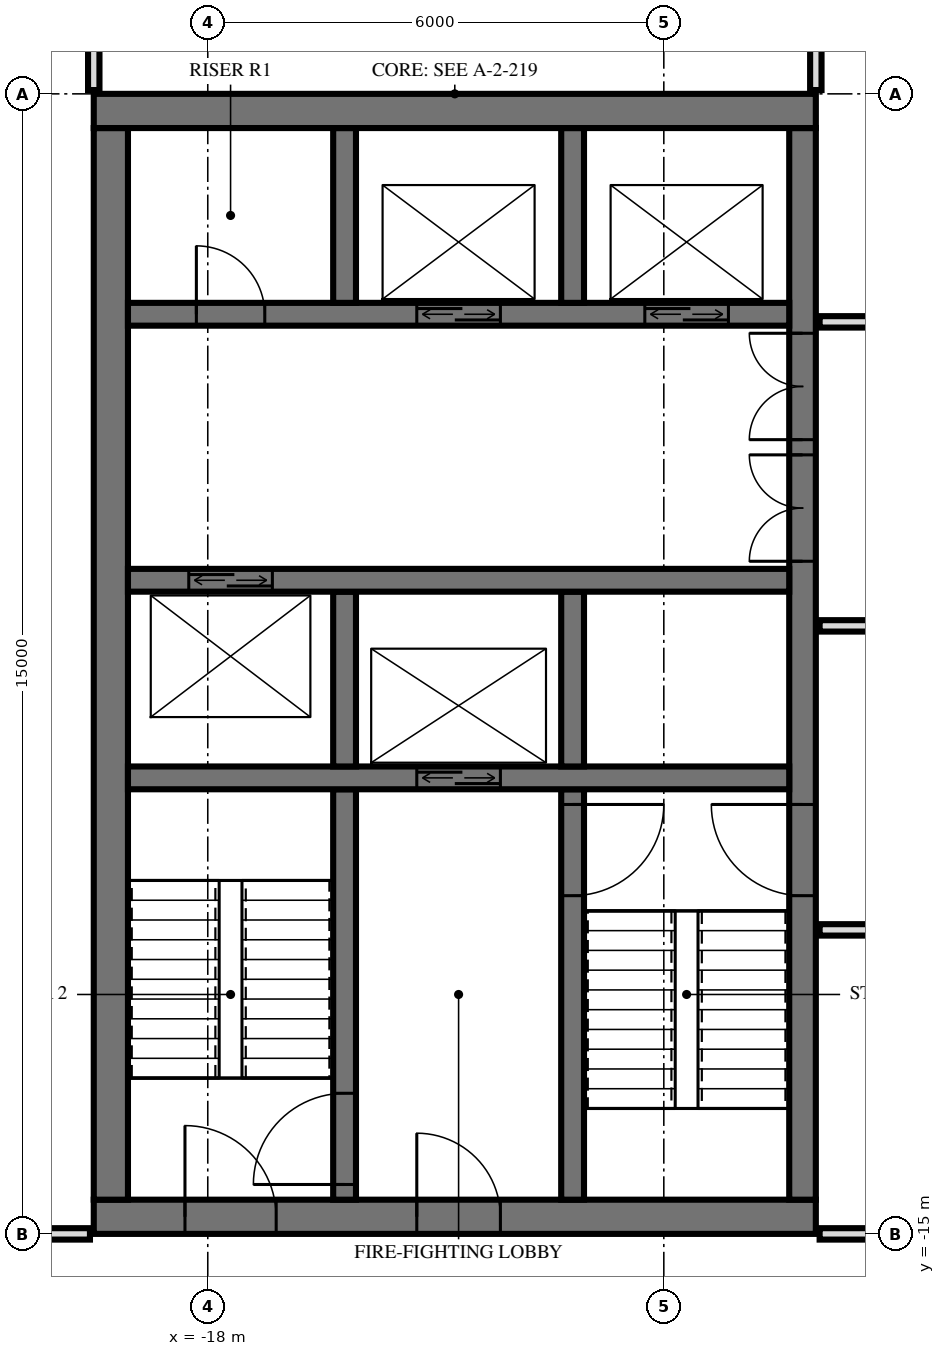
"""IFC4 building model, lengths in metres.
Left out: names, types, materials, properties, quantities, classifications, styles, units other than length and angle.
Written with IfcOpenShell. Run it as: python <this file> out.ifc"""

import sys

from ifc_helpers import new_model, si_unit, direction, frame, frame_2d, origin, place, context, subcontext, project, spatial, rectangle, extrude, element, fill, save


model = new_model("IFC4")
c1 = context("Model", 3, precision=1e-05, world=origin(), true_north=direction((0.0, 1.0)))
c2 = subcontext(c1, "Body", "Model", "MODEL_VIEW")
j1 = project(units=[si_unit("LENGTHUNIT", "METRE"), si_unit("PLANEANGLEUNIT", "RADIAN")], contexts=[c1])
p1 = place(None, origin())
s1 = spatial("IfcSite", under=j1, at=p1, CompositionType="ELEMENT")
p2 = place(p1, origin())
s2 = spatial("IfcBuilding", under=s1, at=p2, CompositionType="ELEMENT")
p3 = place(p2, frame((0.0, 0.0, 318.6)))
s3 = spatial("IfcBuildingStorey", under=s2, at=p3, CompositionType="ELEMENT", Elevation=318.6)
p4 = place(p3, frame((-19.5, -0.225, 0.0), z_axis=(0.0, 0.0, 1.0), x_axis=(1.0, 0.0, 0.0)))
e1 = element("IfcWall", 1, at=p4, inside=s3, PredefinedType="SHEAR", context=c2, shape_type="SweptSolid", body=[
    extrude(rectangle(XDim=9.5, YDim=0.45, at=frame_2d((4.75, 0.0))), origin(), (0.0, 0.0, 1.0), 4.0),
])
p5 = place(p3, frame((-19.5, -14.775, 0.0), z_axis=(0.0, 0.0, 1.0), x_axis=(1.0, 0.0, 0.0)))
e2 = element("IfcWall", 2, at=p5, inside=s3, PredefinedType="SHEAR", context=c2, shape_type="SweptSolid", body=[
    extrude(rectangle(XDim=9.5, YDim=0.45, at=frame_2d((4.75, 0.0))), origin(), (0.0, 0.0, 1.0), 4.0),
])
p6 = place(p5, frame((1.2, 0.0, 0.0)))
e3 = element("IfcOpeningElement", 3, at=p6, cuts=e2, PredefinedType="OPENING", context=c2, shape_type="SweptSolid", body=[
    extrude(rectangle(XDim=1.2, YDim=2.1, at=frame_2d((0.6, 1.05))), frame((0.0, 0.235, 0.0), z_axis=(0.0, -1.0, 0.0), x_axis=(1.0, 0.0, 0.0)), (0.0, 0.0, 1.0), 0.47),
])
p7 = place(p5, frame((4.25, 0.0, 0.0)))
e4 = element("IfcOpeningElement", 4, at=p7, cuts=e2, PredefinedType="OPENING", context=c2, shape_type="SweptSolid", body=[
    extrude(rectangle(XDim=1.1, YDim=2.1, at=frame_2d((0.55, 1.05))), frame((0.0, 0.235, 0.0), z_axis=(0.0, -1.0, 0.0), x_axis=(1.0, 0.0, 0.0)), (0.0, 0.0, 1.0), 0.47),
])
p8 = place(p3, frame((-10.175, -14.55, 0.0), z_axis=(0.0, 0.0, 1.0), x_axis=(0.0, 1.0, 0.0)))
e5 = element("IfcWall", 5, at=p8, inside=s3, PredefinedType="SHEAR", context=c2, shape_type="SweptSolid", body=[
    extrude(rectangle(XDim=14.1, YDim=0.35, at=frame_2d((7.05, 0.0))), origin(), (0.0, 0.0, 1.0), 4.0),
])
p9 = place(p8, frame((8.4, 0.0, 0.0)))
e6 = element("IfcOpeningElement", 6, at=p9, cuts=e5, PredefinedType="OPENING", context=c2, shape_type="SweptSolid", body=[
    extrude(rectangle(XDim=1.4, YDim=2.4, at=frame_2d((0.7, 1.2))), frame((0.0, 0.185, 0.0), z_axis=(0.0, -1.0, 0.0), x_axis=(1.0, 0.0, 0.0)), (0.0, 0.0, 1.0), 0.37),
])
p10 = place(p8, frame((10.0, 0.0, 0.0)))
e7 = element("IfcOpeningElement", 7, at=p10, cuts=e5, PredefinedType="OPENING", context=c2, shape_type="SweptSolid", body=[
    extrude(rectangle(XDim=1.4, YDim=2.4, at=frame_2d((0.7, 1.2))), frame((0.0, 0.185, 0.0), z_axis=(0.0, -1.0, 0.0), x_axis=(1.0, 0.0, 0.0)), (0.0, 0.0, 1.0), 0.37),
])
p11 = place(p8, frame((4.0, 0.0, 0.0)))
e8 = element("IfcOpeningElement", 8, at=p11, cuts=e5, PredefinedType="OPENING", context=c2, shape_type="SweptSolid", body=[
    extrude(rectangle(XDim=1.2, YDim=2.1, at=frame_2d((0.6, 1.05))), frame((0.0, 0.185, 0.0), z_axis=(0.0, -1.0, 0.0), x_axis=(1.0, 0.0, 0.0)), (0.0, 0.0, 1.0), 0.37),
])
p12 = place(p3, frame((-19.275, -14.55, 0.0), z_axis=(0.0, 0.0, 1.0), x_axis=(0.0, 1.0, 0.0)))
e9 = element("IfcWall", 9, at=p12, inside=s3, PredefinedType="SHEAR", context=c2, shape_type="SweptSolid", body=[
    extrude(rectangle(XDim=14.1, YDim=0.45, at=frame_2d((7.05, 0.0))), origin(), (0.0, 0.0, 1.0), 4.0),
])
p13 = place(p3, frame((-19.05, -2.9, 0.0), z_axis=(0.0, 0.0, 1.0), x_axis=(1.0, 0.0, 0.0)))
e10 = element("IfcWall", 10, at=p13, inside=s3, PredefinedType="SHEAR", context=c2, shape_type="SweptSolid", body=[
    extrude(rectangle(XDim=8.7, YDim=0.3, at=frame_2d((4.35, 0.0))), origin(), (0.0, 0.0, 1.0), 4.0),
])
p14 = place(p13, frame((6.8, 0.0, 0.0)))
e11 = element("IfcOpeningElement", 11, at=p14, cuts=e10, PredefinedType="OPENING", context=c2, shape_type="SweptSolid", body=[
    extrude(rectangle(XDim=1.1, YDim=2.1, at=frame_2d((0.55, 1.05))), frame((0.0, 0.16, 0.0), z_axis=(0.0, -1.0, 0.0), x_axis=(1.0, 0.0, 0.0)), (0.0, 0.0, 1.0), 0.32),
])
p15 = place(p13, frame((3.8, 0.0, 0.0)))
e12 = element("IfcOpeningElement", 12, at=p15, cuts=e10, PredefinedType="OPENING", context=c2, shape_type="SweptSolid", body=[
    extrude(rectangle(XDim=1.1, YDim=2.1, at=frame_2d((0.55, 1.05))), frame((0.0, 0.16, 0.0), z_axis=(0.0, -1.0, 0.0), x_axis=(1.0, 0.0, 0.0)), (0.0, 0.0, 1.0), 0.32),
])
p16 = place(p13, frame((0.9, 0.0, 0.0)))
e13 = element("IfcOpeningElement", 13, at=p16, cuts=e10, PredefinedType="OPENING", context=c2, shape_type="SweptSolid", body=[
    extrude(rectangle(XDim=0.9, YDim=2.1, at=frame_2d((0.45, 1.05))), frame((0.0, 0.16, 0.0), z_axis=(0.0, -1.0, 0.0), x_axis=(1.0, 0.0, 0.0)), (0.0, 0.0, 1.0), 0.32),
])
p17 = place(p3, frame((-19.05, -6.4, 0.0), z_axis=(0.0, 0.0, 1.0), x_axis=(1.0, 0.0, 0.0)))
e14 = element("IfcWall", 14, at=p17, inside=s3, PredefinedType="SHEAR", context=c2, shape_type="SweptSolid", body=[
    extrude(rectangle(XDim=8.7, YDim=0.3, at=frame_2d((4.35, 0.0))), origin(), (0.0, 0.0, 1.0), 4.0),
])
p18 = place(p17, frame((0.8, 0.0, 0.0)))
e15 = element("IfcOpeningElement", 15, at=p18, cuts=e14, PredefinedType="OPENING", context=c2, shape_type="SweptSolid", body=[
    extrude(rectangle(XDim=1.1, YDim=2.1, at=frame_2d((0.55, 1.05))), frame((0.0, 0.16, 0.0), z_axis=(0.0, -1.0, 0.0), x_axis=(1.0, 0.0, 0.0)), (0.0, 0.0, 1.0), 0.32),
])
p19 = place(p3, frame((-19.05, -9.0, 0.0), z_axis=(0.0, 0.0, 1.0), x_axis=(1.0, 0.0, 0.0)))
e16 = element("IfcWall", 16, at=p19, inside=s3, PredefinedType="SHEAR", context=c2, shape_type="SweptSolid", body=[
    extrude(rectangle(XDim=8.7, YDim=0.3, at=frame_2d((4.35, 0.0))), origin(), (0.0, 0.0, 1.0), 4.0),
])
p20 = place(p19, frame((3.8, 0.0, 0.0)))
e17 = element("IfcOpeningElement", 17, at=p20, cuts=e16, PredefinedType="OPENING", context=c2, shape_type="SweptSolid", body=[
    extrude(rectangle(XDim=1.1, YDim=2.1, at=frame_2d((0.55, 1.05))), frame((0.0, 0.16, 0.0), z_axis=(0.0, -1.0, 0.0), x_axis=(1.0, 0.0, 0.0)), (0.0, 0.0, 1.0), 0.32),
])
for number, where, z_axis, x_axis in (
    (18, (-13.2, -2.75, 0.0), (0.0, 0.0, 1.0), (0.0, 1.0, 0.0)),
    (19, (-13.2, -8.85, 0.0), (0.0, 0.0, 1.0), (0.0, 1.0, 0.0)),
):
    element("IfcWall", number, at=place(p3, frame(where, z_axis=z_axis, x_axis=x_axis)), inside=s3, PredefinedType="SHEAR", context=c2, shape_type="SweptSolid", body=[
        extrude(rectangle(XDim=2.3, YDim=0.3, at=frame_2d((1.15, 0.0))), origin(), (0.0, 0.0, 1.0), 4.0),
    ])
p21 = place(p3, frame((-13.2, -14.55, 0.0), z_axis=(0.0, 0.0, 1.0), x_axis=(0.0, 1.0, 0.0)))
e20 = element("IfcWall", 20, at=p21, inside=s3, PredefinedType="SHEAR", context=c2, shape_type="SweptSolid", body=[
    extrude(rectangle(XDim=5.4, YDim=0.3, at=frame_2d((2.7, 0.0))), origin(), (0.0, 0.0, 1.0), 4.0),
])
p22 = place(p21, frame((4.0, 0.0, 0.0)))
e21 = element("IfcOpeningElement", 21, at=p22, cuts=e20, PredefinedType="OPENING", context=c2, shape_type="SweptSolid", body=[
    extrude(rectangle(XDim=1.2, YDim=2.1, at=frame_2d((0.6, 1.05))), frame((0.0, 0.16, 0.0), z_axis=(0.0, -1.0, 0.0), x_axis=(1.0, 0.0, 0.0)), (0.0, 0.0, 1.0), 0.32),
])
for number, where, z_axis, x_axis in (
    (22, (-16.2, -2.75, 0.0), (0.0, 0.0, 1.0), (0.0, 1.0, 0.0)),
    (23, (-16.2, -8.85, 0.0), (0.0, 0.0, 1.0), (0.0, 1.0, 0.0)),
):
    element("IfcWall", number, at=place(p3, frame(where, z_axis=z_axis, x_axis=x_axis)), inside=s3, PredefinedType="SHEAR", context=c2, shape_type="SweptSolid", body=[
        extrude(rectangle(XDim=2.3, YDim=0.3, at=frame_2d((1.15, 0.0))), origin(), (0.0, 0.0, 1.0), 4.0),
    ])
p23 = place(p3, frame((-16.2, -14.55, 0.0), z_axis=(0.0, 0.0, 1.0), x_axis=(0.0, 1.0, 0.0)))
e24 = element("IfcWall", 24, at=p23, inside=s3, PredefinedType="SHEAR", context=c2, shape_type="SweptSolid", body=[
    extrude(rectangle(XDim=5.4, YDim=0.3, at=frame_2d((2.7, 0.0))), origin(), (0.0, 0.0, 1.0), 4.0),
])
p24 = place(p23, frame((0.2, 0.0, 0.0)))
e25 = element("IfcOpeningElement", 25, at=p24, cuts=e24, PredefinedType="OPENING", context=c2, shape_type="SweptSolid", body=[
    extrude(rectangle(XDim=1.2, YDim=2.1, at=frame_2d((0.6, 1.05))), frame((0.0, 0.16, 0.0), z_axis=(0.0, -1.0, 0.0), x_axis=(1.0, 0.0, 0.0)), (0.0, 0.0, 1.0), 0.32),
])
p25 = place(p3, frame((-19.568, 1.175, 0.0), z_axis=(0.0, 0.0, 1.0), x_axis=(-0.949694735798, -0.313177120489, 0.0)))
e26 = element("IfcWall", 26, at=p25, inside=s3, PredefinedType="SOLIDWALL", context=c2, shape_type="SweptSolid", body=[
    extrude(rectangle(XDim=1.681, YDim=0.25, at=frame_2d((0.841, 0.0))), origin(), (0.0, 0.0, 1.0), 3.72),
])
p26 = place(p3, frame((-10.0, 0.05, 0.0), z_axis=(0.0, 0.0, 1.0), x_axis=(0.0, 1.0, 0.0)))
e27 = element("IfcWall", 27, at=p26, inside=s3, PredefinedType="PARTITIONING", context=c2, shape_type="SweptSolid", body=[
    extrude(rectangle(XDim=2.247, YDim=0.15, at=frame_2d((1.123, 0.0))), origin(), (0.0, 0.0, 1.0), 3.72),
])
p27 = place(p3, frame((-19.5, 0.05, 0.0), z_axis=(0.0, 0.0, 1.0), x_axis=(0.0, 1.0, 0.0)))
e28 = element("IfcWall", 28, at=p27, inside=s3, PredefinedType="PARTITIONING", context=c2, shape_type="SweptSolid", body=[
    extrude(rectangle(XDim=1.08, YDim=0.15, at=frame_2d((0.54, 0.0))), origin(), (0.0, 0.0, 1.0), 3.72),
])
p28 = place(p3, frame((-21.935, -15.0, 0.0), z_axis=(0.0, 0.0, 1.0), x_axis=(1.0, 0.0, 0.0)))
e29 = element("IfcWall", 29, at=p28, inside=s3, PredefinedType="PARTITIONING", context=c2, shape_type="SweptSolid", body=[
    extrude(rectangle(XDim=2.385, YDim=0.15, at=frame_2d((1.192, 0.0))), origin(), (0.0, 0.0, 1.0), 3.72),
])
p29 = place(p28, frame((0.627, 0.0, 0.0)))
e30 = element("IfcOpeningElement", 30, at=p29, cuts=e29, PredefinedType="OPENING", context=c2, shape_type="SweptSolid", body=[
    extrude(rectangle(XDim=1.0, YDim=2.1, at=frame_2d((0.5, 1.05))), frame((0.0, 0.085, 0.0), z_axis=(0.0, -1.0, 0.0), x_axis=(1.0, 0.0, 0.0)), (0.0, 0.0, 1.0), 0.17),
])
p30 = place(p3, frame((-9.95, -15.0, 0.0), z_axis=(0.0, 0.0, 1.0), x_axis=(1.0, 0.0, 0.0)))
e31 = element("IfcWall", 31, at=p30, inside=s3, PredefinedType="PARTITIONING", context=c2, shape_type="SweptSolid", body=[
    extrude(rectangle(XDim=2.642, YDim=0.15, at=frame_2d((1.321, 0.0))), origin(), (0.0, 0.0, 1.0), 3.084),
])
p31 = place(p3, frame((-9.95, -11.0, 0.0), z_axis=(0.0, 0.0, 1.0), x_axis=(1.0, 0.0, 0.0)))
e32 = element("IfcWall", 32, at=p31, inside=s3, PredefinedType="PARTITIONING", context=c2, shape_type="SweptSolid", body=[
    extrude(rectangle(XDim=19.9, YDim=0.15, at=frame_2d((9.95, 0.0))), origin(), (0.0, 0.0, 1.0), 3.72),
])
p32 = place(p31, frame((9.45, 0.0, 0.0)))
e33 = element("IfcOpeningElement", 33, at=p32, cuts=e32, PredefinedType="OPENING", context=c2, shape_type="SweptSolid", body=[
    extrude(rectangle(XDim=1.0, YDim=2.1, at=frame_2d((0.5, 1.05))), frame((0.0, 0.085, 0.0), z_axis=(0.0, -1.0, 0.0), x_axis=(1.0, 0.0, 0.0)), (0.0, 0.0, 1.0), 0.17),
])
p33 = place(p31, frame((15.45, 0.0, 0.0)))
e34 = element("IfcOpeningElement", 34, at=p33, cuts=e32, PredefinedType="OPENING", context=c2, shape_type="SweptSolid", body=[
    extrude(rectangle(XDim=1.0, YDim=2.1, at=frame_2d((0.5, 1.05))), frame((0.0, 0.085, 0.0), z_axis=(0.0, -1.0, 0.0), x_axis=(1.0, 0.0, 0.0)), (0.0, 0.0, 1.0), 0.17),
])
p34 = place(p3, frame((-9.95, -7.0, 0.0), z_axis=(0.0, 0.0, 1.0), x_axis=(1.0, 0.0, 0.0)))
e35 = element("IfcWall", 35, at=p34, inside=s3, PredefinedType="PARTITIONING", context=c2, shape_type="SweptSolid", body=[
    extrude(rectangle(XDim=19.9, YDim=0.15, at=frame_2d((9.95, 0.0))), origin(), (0.0, 0.0, 1.0), 3.72),
])
p35 = place(p34, frame((9.45, 0.0, 0.0)))
e36 = element("IfcOpeningElement", 36, at=p35, cuts=e35, PredefinedType="OPENING", context=c2, shape_type="SweptSolid", body=[
    extrude(rectangle(XDim=1.0, YDim=2.1, at=frame_2d((0.5, 1.05))), frame((0.0, 0.085, 0.0), z_axis=(0.0, -1.0, 0.0), x_axis=(1.0, 0.0, 0.0)), (0.0, 0.0, 1.0), 0.17),
])
p36 = place(p34, frame((3.45, 0.0, 0.0)))
e37 = element("IfcOpeningElement", 37, at=p36, cuts=e35, PredefinedType="OPENING", context=c2, shape_type="SweptSolid", body=[
    extrude(rectangle(XDim=1.0, YDim=2.1, at=frame_2d((0.5, 1.05))), frame((0.0, 0.085, 0.0), z_axis=(0.0, -1.0, 0.0), x_axis=(1.0, 0.0, 0.0)), (0.0, 0.0, 1.0), 0.17),
])
p37 = place(p3, frame((-9.95, -3.0, 0.0), z_axis=(0.0, 0.0, 1.0), x_axis=(1.0, 0.0, 0.0)))
e38 = element("IfcWall", 38, at=p37, inside=s3, PredefinedType="PARTITIONING", context=c2, shape_type="SweptSolid", body=[
    extrude(rectangle(XDim=19.9, YDim=0.15, at=frame_2d((9.95, 0.0))), origin(), (0.0, 0.0, 1.0), 3.72),
])
p38 = place(p37, frame((1.95, 0.0, 0.0)))
e39 = element("IfcOpeningElement", 39, at=p38, cuts=e38, PredefinedType="OPENING", context=c2, shape_type="SweptSolid", body=[
    extrude(rectangle(XDim=1.0, YDim=2.1, at=frame_2d((0.5, 1.05))), frame((0.0, 0.085, 0.0), z_axis=(0.0, -1.0, 0.0), x_axis=(1.0, 0.0, 0.0)), (0.0, 0.0, 1.0), 0.17),
])
p39 = place(p37, frame((5.95, 0.0, 0.0)))
e40 = element("IfcOpeningElement", 40, at=p39, cuts=e38, PredefinedType="OPENING", context=c2, shape_type="SweptSolid", body=[
    extrude(rectangle(XDim=1.0, YDim=2.1, at=frame_2d((0.5, 1.05))), frame((0.0, 0.085, 0.0), z_axis=(0.0, -1.0, 0.0), x_axis=(1.0, 0.0, 0.0)), (0.0, 0.0, 1.0), 0.17),
])
p40 = place(p37, frame((8.7, 0.0, 0.0)))
e41 = element("IfcOpeningElement", 41, at=p40, cuts=e38, PredefinedType="OPENING", context=c2, shape_type="SweptSolid", body=[
    extrude(rectangle(XDim=1.0, YDim=2.1, at=frame_2d((0.5, 1.05))), frame((0.0, 0.085, 0.0), z_axis=(0.0, -1.0, 0.0), x_axis=(1.0, 0.0, 0.0)), (0.0, 0.0, 1.0), 0.17),
])
p41 = place(p37, frame((14.7, 0.0, 0.0)))
e42 = element("IfcOpeningElement", 42, at=p41, cuts=e38, PredefinedType="OPENING", context=c2, shape_type="SweptSolid", body=[
    extrude(rectangle(XDim=1.0, YDim=2.1, at=frame_2d((0.5, 1.05))), frame((0.0, 0.085, 0.0), z_axis=(0.0, -1.0, 0.0), x_axis=(1.0, 0.0, 0.0)), (0.0, 0.0, 1.0), 0.17),
])
p42 = place(p14, origin())
e43 = element("IfcDoor", 43, at=p42, inside=s3, OperationType="DOUBLE_DOOR_SLIDING", PredefinedType="USERDEFINED", context=c2, shape_type="SweptSolid", body=[
    extrude(rectangle(XDim=1.1, YDim=2.1, at=frame_2d((0.55, 1.05))), frame((0.0, 0.025, 0.0), z_axis=(0.0, -1.0, 0.0), x_axis=(1.0, 0.0, 0.0)), (0.0, 0.0, 1.0), 0.05),
])
fill(e11, e43)
p43 = place(p15, origin())
e44 = element("IfcDoor", 44, at=p43, inside=s3, OperationType="DOUBLE_DOOR_SLIDING", PredefinedType="USERDEFINED", context=c2, shape_type="SweptSolid", body=[
    extrude(rectangle(XDim=1.1, YDim=2.1, at=frame_2d((0.55, 1.05))), frame((0.0, 0.025, 0.0), z_axis=(0.0, -1.0, 0.0), x_axis=(1.0, 0.0, 0.0)), (0.0, 0.0, 1.0), 0.05),
])
fill(e12, e44)
p44 = place(p20, origin())
e45 = element("IfcDoor", 45, at=p44, inside=s3, OperationType="DOUBLE_DOOR_SLIDING", PredefinedType="USERDEFINED", context=c2, shape_type="SweptSolid", body=[
    extrude(rectangle(XDim=1.1, YDim=2.1, at=frame_2d((0.55, 1.05))), frame((0.0, 0.025, 0.0), z_axis=(0.0, -1.0, 0.0), x_axis=(1.0, 0.0, 0.0)), (0.0, 0.0, 1.0), 0.05),
])
fill(e17, e45)
p45 = place(p18, origin())
e46 = element("IfcDoor", 46, at=p45, inside=s3, OperationType="DOUBLE_DOOR_SLIDING", PredefinedType="USERDEFINED", context=c2, shape_type="SweptSolid", body=[
    extrude(rectangle(XDim=1.1, YDim=2.1, at=frame_2d((0.55, 1.05))), frame((0.0, 0.025, 0.0), z_axis=(0.0, -1.0, 0.0), x_axis=(1.0, 0.0, 0.0)), (0.0, 0.0, 1.0), 0.05),
])
fill(e15, e46)
p46 = place(p9, origin())
e47 = element("IfcDoor", 47, at=p46, inside=s3, OperationType="DOUBLE_DOOR_SINGLE_SWING", PredefinedType="DOOR", context=c2, shape_type="SweptSolid", body=[
    extrude(rectangle(XDim=1.4, YDim=2.4, at=frame_2d((0.7, 1.2))), frame((0.0, 0.025, 0.0), z_axis=(0.0, -1.0, 0.0), x_axis=(1.0, 0.0, 0.0)), (0.0, 0.0, 1.0), 0.05),
])
fill(e6, e47)
p47 = place(p10, origin())
e48 = element("IfcDoor", 48, at=p47, inside=s3, OperationType="DOUBLE_DOOR_SINGLE_SWING", PredefinedType="DOOR", context=c2, shape_type="SweptSolid", body=[
    extrude(rectangle(XDim=1.4, YDim=2.4, at=frame_2d((0.7, 1.2))), frame((0.0, 0.025, 0.0), z_axis=(0.0, -1.0, 0.0), x_axis=(1.0, 0.0, 0.0)), (0.0, 0.0, 1.0), 0.05),
])
fill(e7, e48)
p48 = place(p11, origin())
e49 = element("IfcDoor", 49, at=p48, inside=s3, OperationType="SINGLE_SWING_LEFT", PredefinedType="DOOR", context=c2, shape_type="SweptSolid", body=[
    extrude(rectangle(XDim=1.2, YDim=2.1, at=frame_2d((0.6, 1.05))), frame((0.0, 0.025, 0.0), z_axis=(0.0, -1.0, 0.0), x_axis=(1.0, 0.0, 0.0)), (0.0, 0.0, 1.0), 0.05),
])
fill(e8, e49)
p49 = place(p6, origin())
e50 = element("IfcDoor", 50, at=p49, inside=s3, OperationType="SINGLE_SWING_RIGHT", PredefinedType="DOOR", context=c2, shape_type="SweptSolid", body=[
    extrude(rectangle(XDim=1.2, YDim=2.1, at=frame_2d((0.6, 1.05))), frame((0.0, 0.025, 0.0), z_axis=(0.0, -1.0, 0.0), x_axis=(1.0, 0.0, 0.0)), (0.0, 0.0, 1.0), 0.05),
])
fill(e3, e50)
p50 = place(p7, origin())
e51 = element("IfcDoor", 51, at=p50, inside=s3, OperationType="SINGLE_SWING_RIGHT", PredefinedType="DOOR", context=c2, shape_type="SweptSolid", body=[
    extrude(rectangle(XDim=1.1, YDim=2.1, at=frame_2d((0.55, 1.05))), frame((0.0, 0.025, 0.0), z_axis=(0.0, -1.0, 0.0), x_axis=(1.0, 0.0, 0.0)), (0.0, 0.0, 1.0), 0.05),
])
fill(e4, e51)
p51 = place(p16, origin())
e52 = element("IfcDoor", 52, at=p51, inside=s3, OperationType="SINGLE_SWING_RIGHT", PredefinedType="DOOR", context=c2, shape_type="SweptSolid", body=[
    extrude(rectangle(XDim=0.9, YDim=2.1, at=frame_2d((0.45, 1.05))), frame((0.0, 0.025, 0.0), z_axis=(0.0, -1.0, 0.0), x_axis=(1.0, 0.0, 0.0)), (0.0, 0.0, 1.0), 0.05),
])
fill(e13, e52)
p52 = place(p22, frame((0.6, 0.0, 0.0), z_axis=(0.0, 0.0, 1.0), x_axis=(-1.0, 0.0, 0.0)))
e53 = element("IfcDoor", 53, at=p52, inside=s3, OperationType="SINGLE_SWING_RIGHT", PredefinedType="DOOR", context=c2, shape_type="SweptSolid", body=[
    extrude(rectangle(XDim=1.2, YDim=2.1, at=frame_2d((0.0, 1.05))), frame((0.0, -0.025, 0.0), z_axis=(0.0, 1.0, 0.0), x_axis=(-1.0, 0.0, 0.0)), (0.0, 0.0, 1.0), 0.05),
])
fill(e21, e53)
p53 = place(p24, origin())
e54 = element("IfcDoor", 54, at=p53, inside=s3, OperationType="SINGLE_SWING_RIGHT", PredefinedType="DOOR", context=c2, shape_type="SweptSolid", body=[
    extrude(rectangle(XDim=1.2, YDim=2.1, at=frame_2d((0.6, 1.05))), frame((0.0, 0.025, 0.0), z_axis=(0.0, -1.0, 0.0), x_axis=(1.0, 0.0, 0.0)), (0.0, 0.0, 1.0), 0.05),
])
fill(e25, e54)
save(model, sys.argv[1])
